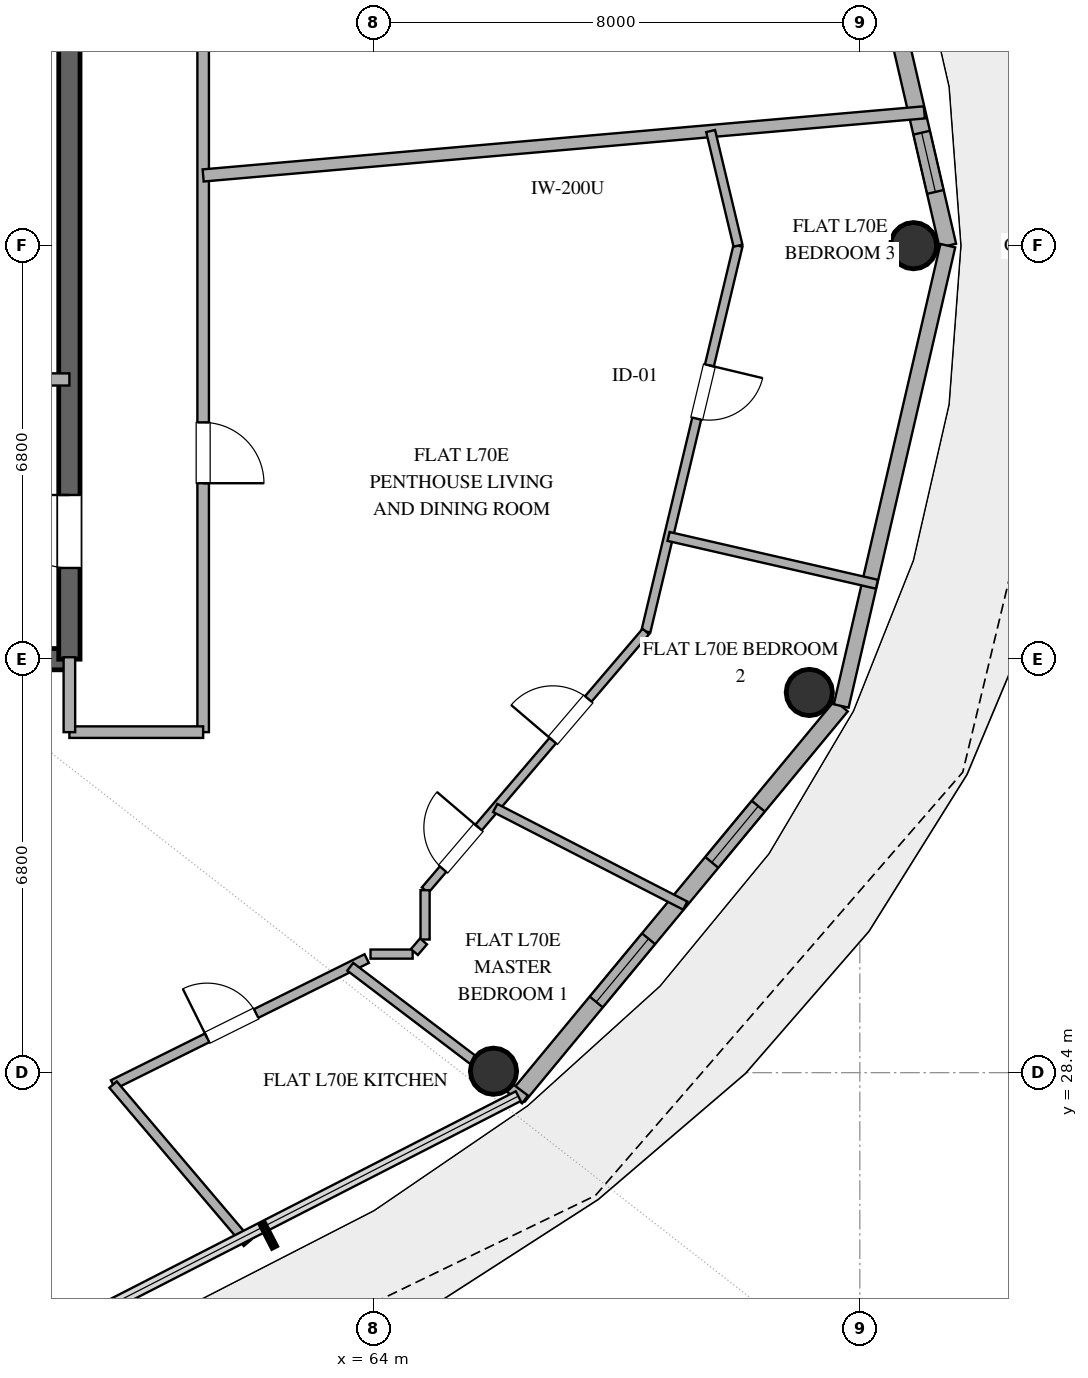
"""IFC4 building model, lengths in metres.
Left out: names, types, materials, properties, quantities, classifications, styles, units other than length and angle.
Written with IfcOpenShell. Run it as: python <this file> out.ifc"""

import sys

from ifc_helpers import new_model, si_unit, direction, frame, frame_2d, origin, origin_2d, place, context, subcontext, project, spatial, rectangle, hollow_circle, extrude, element, fill, save


model = new_model("IFC4")
c1 = context("Model", 3, precision=1e-05, world=origin(), true_north=direction((0.0, 1.0)))
c2 = subcontext(c1, "Body", "Model", "MODEL_VIEW")
j1 = project(units=[si_unit("LENGTHUNIT", "METRE"), si_unit("PLANEANGLEUNIT", "RADIAN")], contexts=[c1])
p1 = place(None, origin())
s1 = spatial("IfcSite", under=j1, at=p1, CompositionType="ELEMENT")
p2 = place(p1, origin())
s2 = spatial("IfcBuilding", under=s1, at=p2, CompositionType="ELEMENT")
p3 = place(p2, frame((0.0, 0.0, 273.0)))
s3 = spatial("IfcBuildingStorey", under=s2, at=p3, CompositionType="ELEMENT", Elevation=273.0)
p4 = place(p3, frame((55.0, 35.2, 0.0), z_axis=(0.0, 0.0, 1.0), x_axis=(1.0, 0.0, 0.0)))
e1 = element("IfcWall", 1, at=p4, inside=s3, PredefinedType="SHEAR", context=c2, shape_type="SweptSolid", body=[
    extrude(rectangle(XDim=4.0, YDim=0.35, at=frame_2d((2.0, 0.0))), origin(), (0.0, 0.0, 1.0), 3.37),
])
p5 = place(p3, frame((59.0, 35.2, 0.0), z_axis=(0.0, 0.0, 1.0), x_axis=(0.0, 1.0, 0.0)))
e2 = element("IfcWall", 2, at=p5, inside=s3, PredefinedType="SHEAR", context=c2, shape_type="SweptSolid", body=[
    extrude(rectangle(XDim=13.6, YDim=0.35, at=frame_2d((6.8, 0.0))), origin(), (0.0, 0.0, 1.0), 3.37),
])
p6 = place(p5, frame((1.5, 0.0, 0.0)))
e3 = element("IfcOpeningElement", 3, at=p6, cuts=e2, PredefinedType="OPENING", context=c2, shape_type="SweptSolid", body=[
    extrude(rectangle(XDim=1.2, YDim=2.15, at=frame_2d((0.6, 1.075))), frame((0.0, 0.185, 0.0), z_axis=(0.0, -1.0, 0.0), x_axis=(1.0, 0.0, 0.0)), (0.0, 0.0, 1.0), 0.37),
])
for number, where, z_axis, x_axis in (
    (4, (72.883, 42.0, 0.0), (0.0, 0.0, 1.0), (1.0, 0.0, 0.0)),
    (5, (65.975, 28.424, 0.0), (0.0, 0.0, 1.0), (1.0, 0.0, 0.0)),
    (6, (71.169, 34.653, 0.0), (0.0, 0.0, 1.0), (1.0, 0.0, 0.0)),
):
    element("IfcColumn", number, at=place(p3, frame(where, z_axis=z_axis, x_axis=x_axis)), inside=s3, PredefinedType="COLUMN", context=c2, shape_type="SweptSolid", body=[
        extrude(hollow_circle(Radius=0.381, WallThickness=0.025, at=origin_2d()), origin(), (0.0, 0.0, 1.0), 3.37),
    ])
p7 = place(p3, frame((73.447, 42.0, 0.0), z_axis=(0.0, 0.0, 1.0), x_axis=(-0.225635078214, 0.974211892495, 0.0)))
e7 = element("IfcWall", 7, at=p7, inside=s3, PredefinedType="SOLIDWALL", context=c2, shape_type="SweptSolid", body=[
    extrude(rectangle(XDim=7.77, YDim=0.28, at=frame_2d((3.885, 0.0))), origin(), (0.0, 0.0, 1.0), 3.37),
])
p8 = place(p7, frame((5.142, 0.0, 0.0)))
e8 = element("IfcOpeningElement", 8, at=p8, cuts=e7, PredefinedType="OPENING", context=c2, shape_type="SweptSolid", body=[
    extrude(rectangle(XDim=1.1, YDim=2.25, at=frame_2d((0.55, 1.125))), frame((0.0, 0.15, 0.0), z_axis=(0.0, -1.0, 0.0), x_axis=(1.0, 0.0, 0.0)), (0.0, 0.0, 1.0), 0.3),
])
p9 = place(p7, frame((0.907, 0.0, 0.85)))
e9 = element("IfcOpeningElement", 9, at=p9, cuts=e7, PredefinedType="OPENING", context=c2, shape_type="SweptSolid", body=[
    extrude(rectangle(XDim=1.0, YDim=1.8, at=frame_2d((0.5, 0.9))), frame((0.0, 0.15, 0.0), z_axis=(0.0, -1.0, 0.0), x_axis=(1.0, 0.0, 0.0)), (0.0, 0.0, 1.0), 0.3),
])
p10 = place(p3, frame((66.383, 28.013, 0.0), z_axis=(0.0, 0.0, 1.0), x_axis=(0.63761509934, 0.770355103243, 0.0)))
e10 = element("IfcWall", 10, at=p10, inside=s3, PredefinedType="SOLIDWALL", context=c2, shape_type="SweptSolid", body=[
    extrude(rectangle(XDim=8.33, YDim=0.28, at=frame_2d((4.165, 0.0))), origin(), (0.0, 0.0, 1.0), 3.37),
])
p11 = place(p10, frame((2.011, 0.0, 0.85)))
e11 = element("IfcOpeningElement", 11, at=p11, cuts=e10, PredefinedType="OPENING", context=c2, shape_type="SweptSolid", body=[
    extrude(rectangle(XDim=1.35, YDim=1.8, at=frame_2d((0.675, 0.9))), frame((0.0, 0.15, 0.0), z_axis=(0.0, -1.0, 0.0), x_axis=(1.0, 0.0, 0.0)), (0.0, 0.0, 1.0), 0.3),
])
p12 = place(p10, frame((4.991, 0.0, 0.85)))
e12 = element("IfcOpeningElement", 12, at=p12, cuts=e10, PredefinedType="OPENING", context=c2, shape_type="SweptSolid", body=[
    extrude(rectangle(XDim=1.2, YDim=1.8, at=frame_2d((0.6, 0.9))), frame((0.0, 0.15, 0.0), z_axis=(0.0, -1.0, 0.0), x_axis=(1.0, 0.0, 0.0)), (0.0, 0.0, 1.0), 0.3),
])
p13 = place(p3, frame((71.694, 34.43, 0.0), z_axis=(0.0, 0.0, 1.0), x_axis=(0.225635078214, 0.974211892495, 0.0)))
e13 = element("IfcWall", 13, at=p13, inside=s3, PredefinedType="SOLIDWALL", context=c2, shape_type="SweptSolid", body=[
    extrude(rectangle(XDim=7.77, YDim=0.25, at=frame_2d((3.885, 0.0))), origin(), (0.0, 0.0, 1.0), 3.37),
])
p14 = place(p3, frame((55.0, 39.8, 0.0), z_axis=(0.0, 0.0, 1.0), x_axis=(1.0, 0.0, 0.0)))
e14 = element("IfcWall", 14, at=p14, inside=s3, PredefinedType="SOLIDWALL", context=c2, shape_type="SweptSolid", body=[
    extrude(rectangle(XDim=4.0, YDim=0.2, at=frame_2d((2.0, 0.0))), origin(), (0.0, 0.0, 1.0), 2.73),
])
p15 = place(p14, frame((1.45, 0.0, 0.0)))
e15 = element("IfcOpeningElement", 15, at=p15, cuts=e14, PredefinedType="OPENING", context=c2, shape_type="SweptSolid", body=[
    extrude(rectangle(XDim=1.1, YDim=2.15, at=frame_2d((0.55, 1.075))), frame((0.0, 0.11, 0.0), z_axis=(0.0, -1.0, 0.0), x_axis=(1.0, 0.0, 0.0)), (0.0, 0.0, 1.0), 0.22),
])
p16 = place(p3, frame((61.2, 50.9, 0.0), z_axis=(0.0, 0.0, 1.0), x_axis=(0.0, -1.0, 0.0)))
e16 = element("IfcWall", 16, at=p16, inside=s3, PredefinedType="PARTITIONING", context=c2, shape_type="SweptSolid", body=[
    extrude(rectangle(XDim=16.9, YDim=0.19, at=frame_2d((8.45, 0.0))), origin(), (0.0, 0.0, 1.0), 2.73),
])
p17 = place(p16, frame((11.807, 0.0, 0.0)))
e17 = element("IfcOpeningElement", 17, at=p17, cuts=e16, PredefinedType="OPENING", context=c2, shape_type="SweptSolid", body=[
    extrude(rectangle(XDim=1.0, YDim=2.2, at=frame_2d((0.5, 1.1))), frame((0.0, 0.105, 0.0), z_axis=(0.0, -1.0, 0.0), x_axis=(1.0, 0.0, 0.0)), (0.0, 0.0, 1.0), 0.21),
])
p18 = place(p16, frame((3.389, 0.0, 0.0)))
e18 = element("IfcOpeningElement", 18, at=p18, cuts=e16, PredefinedType="OPENING", context=c2, shape_type="SweptSolid", body=[
    extrude(rectangle(XDim=1.0, YDim=2.2, at=frame_2d((0.5, 1.1))), frame((0.0, 0.105, 0.0), z_axis=(0.0, -1.0, 0.0), x_axis=(1.0, 0.0, 0.0)), (0.0, 0.0, 1.0), 0.21),
])
p19 = place(p3, frame((73.061, 44.192, 0.0), z_axis=(0.0, 0.0, 1.0), x_axis=(-0.996195520097, -0.087146346673, 0.0)))
e19 = element("IfcWall", 19, at=p19, inside=s3, PredefinedType="PARTITIONING", context=c2, shape_type="SweptSolid", body=[
    extrude(rectangle(XDim=11.906, YDim=0.2, at=frame_2d((5.953, 0.0))), origin(), (0.0, 0.0, 1.0), 2.73),
])
p20 = place(p3, frame((69.996, 42.0, 0.0), z_axis=(0.0, 0.0, 1.0), x_axis=(-0.232298462197, -0.972644551962, 0.0)))
e20 = element("IfcWall", 20, at=p20, inside=s3, PredefinedType="PARTITIONING", context=c2, shape_type="SweptSolid", body=[
    extrude(rectangle(XDim=6.523, YDim=0.15, at=frame_2d((3.262, 0.0))), origin(), (0.0, 0.0, 1.0), 2.73),
])
p21 = place(p20, frame((2.024, 0.0, 0.0)))
e21 = element("IfcOpeningElement", 21, at=p21, cuts=e20, PredefinedType="OPENING", context=c2, shape_type="SweptSolid", body=[
    extrude(rectangle(XDim=0.9, YDim=2.1, at=frame_2d((0.45, 1.05))), frame((0.0, 0.085, 0.0), z_axis=(0.0, -1.0, 0.0), x_axis=(1.0, 0.0, 0.0)), (0.0, 0.0, 1.0), 0.17),
])
p22 = place(p3, frame((59.718, 28.204, 0.0), z_axis=(0.0, 0.0, 1.0), x_axis=(0.895587741002, 0.444884926882, 0.0)))
e22 = element("IfcWall", 22, at=p22, inside=s3, PredefinedType="PLUMBINGWALL", context=c2, shape_type="SweptSolid", body=[
    extrude(rectangle(XDim=4.658, YDim=0.16, at=frame_2d((2.329, 0.0))), origin(), (0.0, 0.0, 1.0), 2.73),
])
p23 = place(p22, frame((1.728, 0.0, 0.0)))
e23 = element("IfcOpeningElement", 23, at=p23, cuts=e22, PredefinedType="OPENING", context=c2, shape_type="SweptSolid", body=[
    extrude(rectangle(XDim=0.9, YDim=2.1, at=frame_2d((0.45, 1.05))), frame((0.0, 0.09, 0.0), z_axis=(0.0, -1.0, 0.0), x_axis=(1.0, 0.0, 0.0)), (0.0, 0.0, 1.0), 0.18),
])
p24 = place(p3, frame((64.85, 31.401, 0.0), z_axis=(0.0, 0.0, 1.0), x_axis=(0.649208179997, 0.760610767097, 0.0)))
e24 = element("IfcWall", 24, at=p24, inside=s3, PredefinedType="PARTITIONING", context=c2, shape_type="SweptSolid", body=[
    extrude(rectangle(XDim=5.593, YDim=0.14, at=frame_2d((2.796, 0.0))), origin(), (0.0, 0.0, 1.0), 2.73),
])
p25 = place(p24, frame((3.235, 0.0, 0.0)))
e25 = element("IfcOpeningElement", 25, at=p25, cuts=e24, PredefinedType="OPENING", context=c2, shape_type="SweptSolid", body=[
    extrude(rectangle(XDim=0.9, YDim=2.1, at=frame_2d((0.45, 1.05))), frame((0.0, 0.08, 0.0), z_axis=(0.0, -1.0, 0.0), x_axis=(1.0, 0.0, 0.0)), (0.0, 0.0, 1.0), 0.16),
])
p26 = place(p24, frame((0.455, 0.0, 0.0)))
e26 = element("IfcOpeningElement", 26, at=p26, cuts=e24, PredefinedType="OPENING", context=c2, shape_type="SweptSolid", body=[
    extrude(rectangle(XDim=0.9, YDim=2.1, at=frame_2d((0.45, 1.05))), frame((0.0, 0.08, 0.0), z_axis=(0.0, -1.0, 0.0), x_axis=(1.0, 0.0, 0.0)), (0.0, 0.0, 1.0), 0.16),
])
p27 = place(p3, frame((63.619, 30.142, 0.0), z_axis=(0.0, 0.0, 1.0), x_axis=(0.796471054337, -0.604676657068, 0.0)))
e27 = element("IfcWall", 27, at=p27, inside=s3, PredefinedType="PLUMBINGWALL", context=c2, shape_type="SweptSolid", body=[
    extrude(rectangle(XDim=3.609, YDim=0.16, at=frame_2d((1.804, 0.0))), origin(), (0.0, 0.0, 1.0), 2.73),
])
p28 = place(p3, frame((72.281, 36.432, 0.0), z_axis=(0.0, 0.0, 1.0), x_axis=(-0.974703956651, 0.223499881182, 0.0)))
e28 = element("IfcWall", 28, at=p28, inside=s3, PredefinedType="PARTITIONING", context=c2, shape_type="SweptSolid", body=[
    extrude(rectangle(XDim=3.515, YDim=0.15, at=frame_2d((1.758, 0.0))), origin(), (0.0, 0.0, 1.0), 2.73),
])
p29 = place(p3, frame((69.129, 31.148, 0.0), z_axis=(0.0, 0.0, 1.0), x_axis=(-0.889538013169, 0.456861163951, 0.0)))
e29 = element("IfcWall", 29, at=p29, inside=s3, PredefinedType="PARTITIONING", context=c2, shape_type="SweptSolid", body=[
    extrude(rectangle(XDim=3.513, YDim=0.15, at=frame_2d((1.756, 0.0))), origin(), (0.0, 0.0, 1.0), 2.73),
])
p30 = place(p3, frame((61.929, 25.601, 0.0), z_axis=(0.0, 0.0, 1.0), x_axis=(-0.64737032118, 0.762175614446, 0.0)))
e30 = element("IfcWall", 30, at=p30, inside=s3, PredefinedType="PLUMBINGWALL", context=c2, shape_type="SweptSolid", body=[
    extrude(rectangle(XDim=3.415, YDim=0.16, at=frame_2d((1.708, 0.0))), origin(), (0.0, 0.0, 1.0), 2.73),
])
p31 = place(p3, frame((61.2, 34.0, 0.0), z_axis=(0.0, 0.0, 1.0), x_axis=(-1.0, 0.0, 0.0)))
e31 = element("IfcWall", 31, at=p31, inside=s3, PredefinedType="PARTITIONING", context=c2, shape_type="SweptSolid", body=[
    extrude(rectangle(XDim=2.2, YDim=0.19, at=frame_2d((1.1, 0.0))), origin(), (0.0, 0.0, 1.0), 2.73),
])
p32 = place(p3, frame((69.546, 43.885, 0.0), z_axis=(0.0, 0.0, 1.0), x_axis=(0.232296027223, -0.972645133508, 0.0)))
e32 = element("IfcWall", 32, at=p32, inside=s3, PredefinedType="PARTITIONING", context=c2, shape_type="SweptSolid", body=[
    extrude(rectangle(XDim=1.938, YDim=0.15, at=frame_2d((0.969, 0.0))), origin(), (0.0, 0.0, 1.0), 2.73),
])
p33 = place(p3, frame((59.0, 34.0, 0.0), z_axis=(0.0, 0.0, 1.0), x_axis=(0.0, 1.0, 0.0)))
e33 = element("IfcWall", 33, at=p33, inside=s3, PredefinedType="PARTITIONING", context=c2, shape_type="SweptSolid", body=[
    extrude(rectangle(XDim=1.232, YDim=0.19, at=frame_2d((0.616, 0.0))), origin(), (0.0, 0.0, 1.0), 2.73),
])
p34 = place(p3, frame((64.85, 31.401, 0.0), z_axis=(0.0, 0.0, 1.0), x_axis=(0.0, -1.0, 0.0)))
e34 = element("IfcWall", 34, at=p34, inside=s3, PredefinedType="PARTITIONING", context=c2, shape_type="SweptSolid", body=[
    extrude(rectangle(XDim=0.812, YDim=0.15, at=frame_2d((0.406, 0.0))), origin(), (0.0, 0.0, 1.0), 2.73),
])
p35 = place(p3, frame((64.646, 30.35, 0.0), z_axis=(0.0, 0.0, 1.0), x_axis=(-1.0, 0.0, 0.0)))
e35 = element("IfcWall", 35, at=p35, inside=s3, PredefinedType="PARTITIONING", context=c2, shape_type="SweptSolid", body=[
    extrude(rectangle(XDim=0.693, YDim=0.15, at=frame_2d((0.346, 0.0))), origin(), (0.0, 0.0, 1.0), 2.73),
])
p36 = place(p3, frame((64.824, 30.559, 0.0), z_axis=(0.0, 0.0, 1.0), x_axis=(-0.648874632887, -0.760895334981, 0.0)))
e36 = element("IfcWall", 36, at=p36, inside=s3, PredefinedType="PARTITIONING", context=c2, shape_type="SweptSolid", body=[
    extrude(rectangle(XDim=0.231, YDim=0.15, at=frame_2d((0.115, 0.0))), origin(), (0.0, 0.0, 1.0), 2.73),
])
p37 = place(p11, origin())
e37 = element("IfcWindow", 37, at=p37, inside=s3, PartitioningType="SINGLE_PANEL", PredefinedType="WINDOW", context=c2, shape_type="SweptSolid", body=[
    extrude(rectangle(XDim=1.35, YDim=1.8, at=frame_2d((0.675, 0.9))), frame((0.0, 0.03, 0.0), z_axis=(0.0, -1.0, 0.0), x_axis=(1.0, 0.0, 0.0)), (0.0, 0.0, 1.0), 0.06),
])
fill(e11, e37)
p38 = place(p12, origin())
e38 = element("IfcWindow", 38, at=p38, inside=s3, PartitioningType="SINGLE_PANEL", PredefinedType="WINDOW", context=c2, shape_type="SweptSolid", body=[
    extrude(rectangle(XDim=1.2, YDim=1.8, at=frame_2d((0.6, 0.9))), frame((0.0, 0.03, 0.0), z_axis=(0.0, -1.0, 0.0), x_axis=(1.0, 0.0, 0.0)), (0.0, 0.0, 1.0), 0.06),
])
fill(e12, e38)
p39 = place(p9, origin())
e39 = element("IfcWindow", 39, at=p39, inside=s3, PartitioningType="SINGLE_PANEL", PredefinedType="WINDOW", context=c2, shape_type="SweptSolid", body=[
    extrude(rectangle(XDim=1.0, YDim=1.8, at=frame_2d((0.5, 0.9))), frame((0.0, 0.03, 0.0), z_axis=(0.0, -1.0, 0.0), x_axis=(1.0, 0.0, 0.0)), (0.0, 0.0, 1.0), 0.06),
])
fill(e9, e39)
p40 = place(p6, origin())
e40 = element("IfcDoor", 40, at=p40, inside=s3, OperationType="SINGLE_SWING_RIGHT", PredefinedType="DOOR", context=c2, shape_type="SweptSolid", body=[
    extrude(rectangle(XDim=1.2, YDim=2.15, at=frame_2d((0.6, 1.075))), frame((0.0, 0.025, 0.0), z_axis=(0.0, -1.0, 0.0), x_axis=(1.0, 0.0, 0.0)), (0.0, 0.0, 1.0), 0.05),
])
fill(e3, e40)
p41 = place(p17, origin())
e41 = element("IfcDoor", 41, at=p41, inside=s3, OperationType="SINGLE_SWING_RIGHT", PredefinedType="DOOR", context=c2, shape_type="SweptSolid", body=[
    extrude(rectangle(XDim=1.0, YDim=2.2, at=frame_2d((0.5, 1.1))), frame((0.0, 0.025, 0.0), z_axis=(0.0, -1.0, 0.0), x_axis=(1.0, 0.0, 0.0)), (0.0, 0.0, 1.0), 0.05),
])
fill(e17, e41)
p42 = place(p21, origin())
e42 = element("IfcDoor", 42, at=p42, inside=s3, OperationType="SINGLE_SWING_LEFT", PredefinedType="DOOR", context=c2, shape_type="SweptSolid", body=[
    extrude(rectangle(XDim=0.9, YDim=2.1, at=frame_2d((0.45, 1.05))), frame((0.0, 0.025, 0.0), z_axis=(0.0, -1.0, 0.0), x_axis=(1.0, 0.0, 0.0)), (0.0, 0.0, 1.0), 0.05),
])
fill(e21, e42)
p43 = place(p23, origin())
e43 = element("IfcDoor", 43, at=p43, inside=s3, OperationType="SINGLE_SWING_LEFT", PredefinedType="DOOR", context=c2, shape_type="SweptSolid", body=[
    extrude(rectangle(XDim=0.9, YDim=2.1, at=frame_2d((0.45, 1.05))), frame((0.0, 0.025, 0.0), z_axis=(0.0, -1.0, 0.0), x_axis=(1.0, 0.0, 0.0)), (0.0, 0.0, 1.0), 0.05),
])
fill(e23, e43)
p44 = place(p25, origin())
e44 = element("IfcDoor", 44, at=p44, inside=s3, OperationType="SINGLE_SWING_LEFT", PredefinedType="DOOR", context=c2, shape_type="SweptSolid", body=[
    extrude(rectangle(XDim=0.9, YDim=2.1, at=frame_2d((0.45, 1.05))), frame((0.0, 0.025, 0.0), z_axis=(0.0, -1.0, 0.0), x_axis=(1.0, 0.0, 0.0)), (0.0, 0.0, 1.0), 0.05),
])
fill(e25, e44)
p45 = place(p26, origin())
e45 = element("IfcDoor", 45, at=p45, inside=s3, OperationType="SINGLE_SWING_RIGHT", PredefinedType="DOOR", context=c2, shape_type="SweptSolid", body=[
    extrude(rectangle(XDim=0.9, YDim=2.1, at=frame_2d((0.45, 1.05))), frame((0.0, 0.025, 0.0), z_axis=(0.0, -1.0, 0.0), x_axis=(1.0, 0.0, 0.0)), (0.0, 0.0, 1.0), 0.05),
])
fill(e26, e45)
save(model, sys.argv[1])
